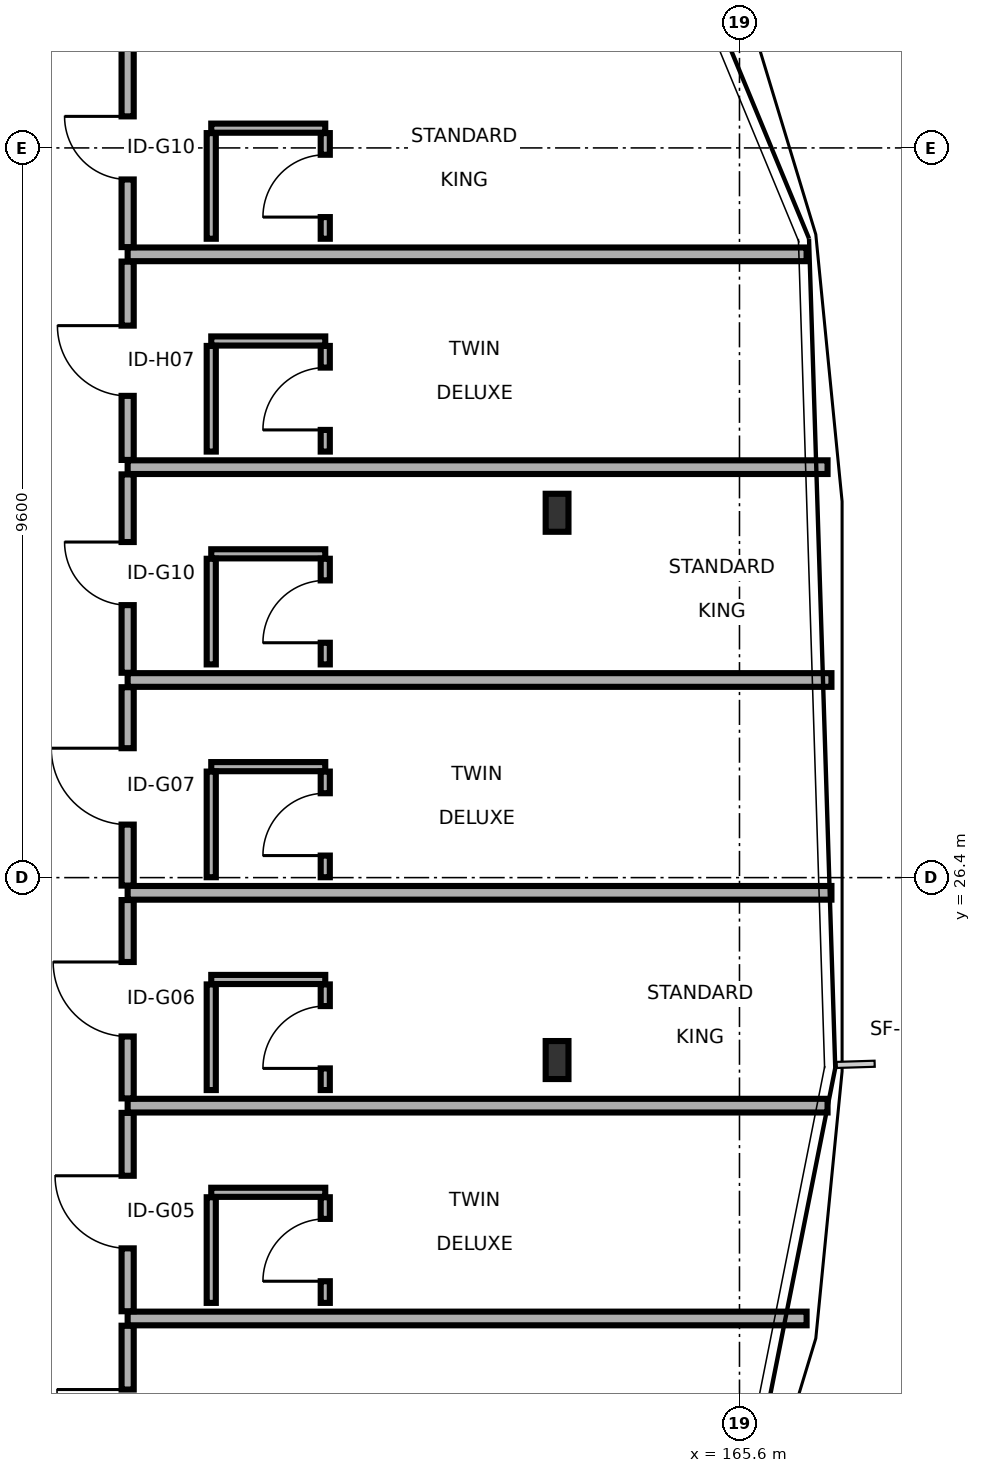
"""IFC4 building model, lengths in metres.
Left out: names, types, materials, properties, quantities, classifications, styles, units other than length and angle.
Written with IfcOpenShell. Run it as: python <this file> out.ifc"""

import sys

from ifc_helpers import new_model, si_unit, direction, frame, frame_2d, origin, origin_2d, place, context, subcontext, project, spatial, rectangle, i_section, extrude, element, fill, save


model = new_model("IFC4")
c1 = context("Model", 3, precision=1e-05, world=origin(), true_north=direction((0.0, 1.0)))
c2 = subcontext(c1, "Body", "Model", "MODEL_VIEW")
j1 = project(units=[si_unit("LENGTHUNIT", "METRE"), si_unit("PLANEANGLEUNIT", "RADIAN")], contexts=[c1])
p1 = place(None, origin())
s1 = spatial("IfcSite", under=j1, at=p1, CompositionType="ELEMENT")
p2 = place(p1, origin())
s2 = spatial("IfcBuilding", under=s1, at=p2, CompositionType="ELEMENT")
p3 = place(p2, frame((0.0, 0.0, 24.9)))
s3 = spatial("IfcBuildingStorey", under=s2, at=p3, CompositionType="ELEMENT", Elevation=24.9)
for number, where, z_axis, x_axis in (
    (1, (163.2, 24.0, 0.0), (0.0, 0.0, 1.0), (1.0, 0.0, 0.0)),
    (2, (163.2, 31.2, 0.0), (0.0, 0.0, 1.0), (1.0, 0.0, 0.0)),
):
    element("IfcColumn", number, at=place(p3, frame(where, z_axis=z_axis, x_axis=x_axis)), inside=s3, PredefinedType="COLUMN", context=c2, shape_type="SweptSolid", body=[
        extrude(i_section(OverallWidth=0.3, OverallDepth=0.5, WebThickness=0.014, FlangeThickness=0.028, FilletRadius=0.027, at=origin_2d()), origin(), (0.0, 0.0, 1.0), 3.4),
    ])
p4 = place(p3, frame((157.55, 17.895, 0.0), z_axis=(0.0, 0.0, 1.0), x_axis=(0.0, 1.0, 0.0)))
e3 = element("IfcWall", 3, at=p4, inside=s3, PredefinedType="PARTITIONING", context=c2, shape_type="SweptSolid", body=[
    extrude(rectangle(XDim=2.61, YDim=0.16, at=frame_2d((1.305, 0.0))), origin(), (0.0, 0.0, 1.0), 3.19),
])
p5 = place(p4, frame((0.84, 0.0, 0.0)))
e4 = element("IfcOpeningElement", 4, at=p5, cuts=e3, PredefinedType="OPENING", context=c2, shape_type="SweptSolid", body=[
    extrude(rectangle(XDim=0.93, YDim=2.05, at=frame_2d((0.465, 1.025))), frame((0.0, 0.09, 0.0), z_axis=(0.0, -1.0, 0.0), x_axis=(1.0, 0.0, 0.0)), (0.0, 0.0, 1.0), 0.18),
])
p6 = place(p3, frame((157.55, 20.6, 0.0), z_axis=(0.0, 0.0, 1.0), x_axis=(1.0, 0.0, 0.0)))
e5 = element("IfcWall", 5, at=p6, inside=s3, PredefinedType="PARTITIONING", context=c2, shape_type="SweptSolid", body=[
    extrude(rectangle(XDim=8.933, YDim=0.18, at=frame_2d((4.466, 0.0))), origin(), (0.0, 0.0, 1.0), 2.675),
])
p7 = place(p3, frame((157.55, 20.695, 0.0), z_axis=(0.0, 0.0, 1.0), x_axis=(0.0, 1.0, 0.0)))
e6 = element("IfcWall", 6, at=p7, inside=s3, PredefinedType="PARTITIONING", context=c2, shape_type="SweptSolid", body=[
    extrude(rectangle(XDim=2.61, YDim=0.16, at=frame_2d((1.305, 0.0))), origin(), (0.0, 0.0, 1.0), 3.19),
])
p8 = place(p7, frame((0.827, 0.0, 0.0)))
e7 = element("IfcOpeningElement", 7, at=p8, cuts=e6, PredefinedType="OPENING", context=c2, shape_type="SweptSolid", body=[
    extrude(rectangle(XDim=0.955, YDim=2.05, at=frame_2d((0.478, 1.025))), frame((0.0, 0.09, 0.0), z_axis=(0.0, -1.0, 0.0), x_axis=(1.0, 0.0, 0.0)), (0.0, 0.0, 1.0), 0.18),
])
p9 = place(p3, frame((158.65, 22.26, 0.0), z_axis=(0.0, 0.0, 1.0), x_axis=(1.0, 0.0, 0.0)))
e8 = element("IfcWall", 8, at=p9, inside=s3, PredefinedType="PARTITIONING", context=c2, shape_type="SweptSolid", body=[
    extrude(rectangle(XDim=1.5, YDim=0.12, at=frame_2d((0.75, 0.0))), origin(), (0.0, 0.0, 1.0), 3.19),
])
p10 = place(p3, frame((158.65, 20.805, 0.0), z_axis=(0.0, 0.0, 1.0), x_axis=(0.0, 1.0, 0.0)))
e9 = element("IfcWall", 9, at=p10, inside=s3, PredefinedType="PARTITIONING", context=c2, shape_type="SweptSolid", body=[
    extrude(rectangle(XDim=1.39, YDim=0.12, at=frame_2d((0.695, 0.0))), origin(), (0.0, 0.0, 1.0), 3.19),
])
p11 = place(p3, frame((160.15, 20.805, 0.0), z_axis=(0.0, 0.0, 1.0), x_axis=(0.0, 1.0, 0.0)))
e10 = element("IfcWall", 10, at=p11, inside=s3, PredefinedType="PARTITIONING", context=c2, shape_type="SweptSolid", body=[
    extrude(rectangle(XDim=1.39, YDim=0.12, at=frame_2d((0.695, 0.0))), origin(), (0.0, 0.0, 1.0), 3.19),
])
p12 = place(p11, frame((0.285, 0.0, 0.0)))
e11 = element("IfcOpeningElement", 11, at=p12, cuts=e10, PredefinedType="OPENING", context=c2, shape_type="SweptSolid", body=[
    extrude(rectangle(XDim=0.82, YDim=2.08, at=frame_2d((0.41, 1.04))), frame((0.0, 0.07, 0.0), z_axis=(0.0, -1.0, 0.0), x_axis=(1.0, 0.0, 0.0)), (0.0, 0.0, 1.0), 0.14),
])
p13 = place(p3, frame((157.55, 23.4, 0.0), z_axis=(0.0, 0.0, 1.0), x_axis=(1.0, 0.0, 0.0)))
e12 = element("IfcWall", 12, at=p13, inside=s3, PredefinedType="PARTITIONING", context=c2, shape_type="SweptSolid", body=[
    extrude(rectangle(XDim=9.209, YDim=0.18, at=frame_2d((4.604, 0.0))), origin(), (0.0, 0.0, 1.0), 2.675),
])
p14 = place(p3, frame((157.55, 23.495, 0.0), z_axis=(0.0, 0.0, 1.0), x_axis=(0.0, 1.0, 0.0)))
e13 = element("IfcWall", 13, at=p14, inside=s3, PredefinedType="PARTITIONING", context=c2, shape_type="SweptSolid", body=[
    extrude(rectangle(XDim=2.61, YDim=0.16, at=frame_2d((1.305, 0.0))), origin(), (0.0, 0.0, 1.0), 2.725),
])
p15 = place(p14, frame((0.815, 0.0, 0.0)))
e14 = element("IfcOpeningElement", 14, at=p15, cuts=e13, PredefinedType="OPENING", context=c2, shape_type="SweptSolid", body=[
    extrude(rectangle(XDim=0.98, YDim=2.05, at=frame_2d((0.49, 1.025))), frame((0.0, 0.09, 0.0), z_axis=(0.0, -1.0, 0.0), x_axis=(1.0, 0.0, 0.0)), (0.0, 0.0, 1.0), 0.18),
])
p16 = place(p3, frame((158.65, 25.06, 0.0), z_axis=(0.0, 0.0, 1.0), x_axis=(1.0, 0.0, 0.0)))
e15 = element("IfcWall", 15, at=p16, inside=s3, PredefinedType="PARTITIONING", context=c2, shape_type="SweptSolid", body=[
    extrude(rectangle(XDim=1.5, YDim=0.12, at=frame_2d((0.75, 0.0))), origin(), (0.0, 0.0, 1.0), 3.19),
])
p17 = place(p3, frame((158.65, 23.605, 0.0), z_axis=(0.0, 0.0, 1.0), x_axis=(0.0, 1.0, 0.0)))
e16 = element("IfcWall", 16, at=p17, inside=s3, PredefinedType="PARTITIONING", context=c2, shape_type="SweptSolid", body=[
    extrude(rectangle(XDim=1.39, YDim=0.12, at=frame_2d((0.695, 0.0))), origin(), (0.0, 0.0, 1.0), 2.725),
])
p18 = place(p3, frame((160.15, 23.605, 0.0), z_axis=(0.0, 0.0, 1.0), x_axis=(0.0, 1.0, 0.0)))
e17 = element("IfcWall", 17, at=p18, inside=s3, PredefinedType="PARTITIONING", context=c2, shape_type="SweptSolid", body=[
    extrude(rectangle(XDim=1.39, YDim=0.12, at=frame_2d((0.695, 0.0))), origin(), (0.0, 0.0, 1.0), 2.725),
])
p19 = place(p18, frame((0.285, 0.0, 0.0)))
e18 = element("IfcOpeningElement", 18, at=p19, cuts=e17, PredefinedType="OPENING", context=c2, shape_type="SweptSolid", body=[
    extrude(rectangle(XDim=0.82, YDim=2.08, at=frame_2d((0.41, 1.04))), frame((0.0, 0.07, 0.0), z_axis=(0.0, -1.0, 0.0), x_axis=(1.0, 0.0, 0.0)), (0.0, 0.0, 1.0), 0.14),
])
p20 = place(p3, frame((157.55, 26.2, 0.0), z_axis=(0.0, 0.0, 1.0), x_axis=(1.0, 0.0, 0.0)))
e19 = element("IfcWall", 19, at=p20, inside=s3, PredefinedType="PARTITIONING", context=c2, shape_type="SweptSolid", body=[
    extrude(rectangle(XDim=9.26, YDim=0.18, at=frame_2d((4.63, 0.0))), origin(), (0.0, 0.0, 1.0), 2.675),
])
p21 = place(p3, frame((157.55, 26.295, 0.0), z_axis=(0.0, 0.0, 1.0), x_axis=(0.0, 1.0, 0.0)))
e20 = element("IfcWall", 20, at=p21, inside=s3, PredefinedType="PARTITIONING", context=c2, shape_type="SweptSolid", body=[
    extrude(rectangle(XDim=2.61, YDim=0.16, at=frame_2d((1.305, 0.0))), origin(), (0.0, 0.0, 1.0), 3.19),
])
p22 = place(p21, frame((0.802, 0.0, 0.0)))
e21 = element("IfcOpeningElement", 21, at=p22, cuts=e20, PredefinedType="OPENING", context=c2, shape_type="SweptSolid", body=[
    extrude(rectangle(XDim=1.005, YDim=2.05, at=frame_2d((0.502, 1.025))), frame((0.0, 0.09, 0.0), z_axis=(0.0, -1.0, 0.0), x_axis=(1.0, 0.0, 0.0)), (0.0, 0.0, 1.0), 0.18),
])
p23 = place(p3, frame((158.65, 27.86, 0.0), z_axis=(0.0, 0.0, 1.0), x_axis=(1.0, 0.0, 0.0)))
e22 = element("IfcWall", 22, at=p23, inside=s3, PredefinedType="PARTITIONING", context=c2, shape_type="SweptSolid", body=[
    extrude(rectangle(XDim=1.5, YDim=0.12, at=frame_2d((0.75, 0.0))), origin(), (0.0, 0.0, 1.0), 3.19),
])
p24 = place(p3, frame((158.65, 26.405, 0.0), z_axis=(0.0, 0.0, 1.0), x_axis=(0.0, 1.0, 0.0)))
e23 = element("IfcWall", 23, at=p24, inside=s3, PredefinedType="PARTITIONING", context=c2, shape_type="SweptSolid", body=[
    extrude(rectangle(XDim=1.39, YDim=0.12, at=frame_2d((0.695, 0.0))), origin(), (0.0, 0.0, 1.0), 3.19),
])
p25 = place(p3, frame((160.15, 26.405, 0.0), z_axis=(0.0, 0.0, 1.0), x_axis=(0.0, 1.0, 0.0)))
e24 = element("IfcWall", 24, at=p25, inside=s3, PredefinedType="PARTITIONING", context=c2, shape_type="SweptSolid", body=[
    extrude(rectangle(XDim=1.39, YDim=0.12, at=frame_2d((0.695, 0.0))), origin(), (0.0, 0.0, 1.0), 3.19),
])
p26 = place(p25, frame((0.285, 0.0, 0.0)))
e25 = element("IfcOpeningElement", 25, at=p26, cuts=e24, PredefinedType="OPENING", context=c2, shape_type="SweptSolid", body=[
    extrude(rectangle(XDim=0.82, YDim=2.08, at=frame_2d((0.41, 1.04))), frame((0.0, 0.07, 0.0), z_axis=(0.0, -1.0, 0.0), x_axis=(1.0, 0.0, 0.0)), (0.0, 0.0, 1.0), 0.14),
])
p27 = place(p3, frame((157.55, 29.0, 0.0), z_axis=(0.0, 0.0, 1.0), x_axis=(1.0, 0.0, 0.0)))
e26 = element("IfcWall", 26, at=p27, inside=s3, PredefinedType="PARTITIONING", context=c2, shape_type="SweptSolid", body=[
    extrude(rectangle(XDim=9.26, YDim=0.18, at=frame_2d((4.63, 0.0))), origin(), (0.0, 0.0, 1.0), 2.675),
])
p28 = place(p3, frame((157.55, 29.095, 0.0), z_axis=(0.0, 0.0, 1.0), x_axis=(0.0, 1.0, 0.0)))
e27 = element("IfcWall", 27, at=p28, inside=s3, PredefinedType="PARTITIONING", context=c2, shape_type="SweptSolid", body=[
    extrude(rectangle(XDim=2.61, YDim=0.16, at=frame_2d((1.305, 0.0))), origin(), (0.0, 0.0, 1.0), 2.725),
])
p29 = place(p28, frame((0.89, 0.0, 0.0)))
e28 = element("IfcOpeningElement", 28, at=p29, cuts=e27, PredefinedType="OPENING", context=c2, shape_type="SweptSolid", body=[
    extrude(rectangle(XDim=0.83, YDim=2.11, at=frame_2d((0.415, 1.055))), frame((0.0, 0.09, 0.0), z_axis=(0.0, -1.0, 0.0), x_axis=(1.0, 0.0, 0.0)), (0.0, 0.0, 1.0), 0.18),
])
p30 = place(p3, frame((158.65, 30.66, 0.0), z_axis=(0.0, 0.0, 1.0), x_axis=(1.0, 0.0, 0.0)))
e29 = element("IfcWall", 29, at=p30, inside=s3, PredefinedType="PARTITIONING", context=c2, shape_type="SweptSolid", body=[
    extrude(rectangle(XDim=1.5, YDim=0.12, at=frame_2d((0.75, 0.0))), origin(), (0.0, 0.0, 1.0), 3.19),
])
p31 = place(p3, frame((158.65, 29.205, 0.0), z_axis=(0.0, 0.0, 1.0), x_axis=(0.0, 1.0, 0.0)))
e30 = element("IfcWall", 30, at=p31, inside=s3, PredefinedType="PARTITIONING", context=c2, shape_type="SweptSolid", body=[
    extrude(rectangle(XDim=1.39, YDim=0.12, at=frame_2d((0.695, 0.0))), origin(), (0.0, 0.0, 1.0), 3.19),
])
p32 = place(p3, frame((160.15, 29.205, 0.0), z_axis=(0.0, 0.0, 1.0), x_axis=(0.0, 1.0, 0.0)))
e31 = element("IfcWall", 31, at=p32, inside=s3, PredefinedType="PARTITIONING", context=c2, shape_type="SweptSolid", body=[
    extrude(rectangle(XDim=1.39, YDim=0.12, at=frame_2d((0.695, 0.0))), origin(), (0.0, 0.0, 1.0), 3.19),
])
p33 = place(p32, frame((0.285, 0.0, 0.0)))
e32 = element("IfcOpeningElement", 32, at=p33, cuts=e31, PredefinedType="OPENING", context=c2, shape_type="SweptSolid", body=[
    extrude(rectangle(XDim=0.82, YDim=2.08, at=frame_2d((0.41, 1.04))), frame((0.0, 0.07, 0.0), z_axis=(0.0, -1.0, 0.0), x_axis=(1.0, 0.0, 0.0)), (0.0, 0.0, 1.0), 0.14),
])
p34 = place(p3, frame((157.55, 31.8, 0.0), z_axis=(0.0, 0.0, 1.0), x_axis=(1.0, 0.0, 0.0)))
e33 = element("IfcWall", 33, at=p34, inside=s3, PredefinedType="PARTITIONING", context=c2, shape_type="SweptSolid", body=[
    extrude(rectangle(XDim=9.209, YDim=0.18, at=frame_2d((4.604, 0.0))), origin(), (0.0, 0.0, 1.0), 2.675),
])
p35 = place(p3, frame((157.55, 31.895, 0.0), z_axis=(0.0, 0.0, 1.0), x_axis=(0.0, 1.0, 0.0)))
e34 = element("IfcWall", 34, at=p35, inside=s3, PredefinedType="PARTITIONING", context=c2, shape_type="SweptSolid", body=[
    extrude(rectangle(XDim=2.61, YDim=0.16, at=frame_2d((1.305, 0.0))), origin(), (0.0, 0.0, 1.0), 3.19),
])
p36 = place(p35, frame((0.843, 0.0, 0.0)))
e35 = element("IfcOpeningElement", 35, at=p36, cuts=e34, PredefinedType="OPENING", context=c2, shape_type="SweptSolid", body=[
    extrude(rectangle(XDim=0.924, YDim=2.16, at=frame_2d((0.462, 1.08))), frame((0.0, 0.09, 0.0), z_axis=(0.0, -1.0, 0.0), x_axis=(1.0, 0.0, 0.0)), (0.0, 0.0, 1.0), 0.18),
])
p37 = place(p3, frame((158.65, 33.46, 0.0), z_axis=(0.0, 0.0, 1.0), x_axis=(1.0, 0.0, 0.0)))
e36 = element("IfcWall", 36, at=p37, inside=s3, PredefinedType="PARTITIONING", context=c2, shape_type="SweptSolid", body=[
    extrude(rectangle(XDim=1.5, YDim=0.12, at=frame_2d((0.75, 0.0))), origin(), (0.0, 0.0, 1.0), 3.19),
])
p38 = place(p3, frame((158.65, 32.005, 0.0), z_axis=(0.0, 0.0, 1.0), x_axis=(0.0, 1.0, 0.0)))
e37 = element("IfcWall", 37, at=p38, inside=s3, PredefinedType="PARTITIONING", context=c2, shape_type="SweptSolid", body=[
    extrude(rectangle(XDim=1.39, YDim=0.12, at=frame_2d((0.695, 0.0))), origin(), (0.0, 0.0, 1.0), 3.19),
])
p39 = place(p3, frame((160.15, 32.005, 0.0), z_axis=(0.0, 0.0, 1.0), x_axis=(0.0, 1.0, 0.0)))
e38 = element("IfcWall", 38, at=p39, inside=s3, PredefinedType="PARTITIONING", context=c2, shape_type="SweptSolid", body=[
    extrude(rectangle(XDim=1.39, YDim=0.12, at=frame_2d((0.695, 0.0))), origin(), (0.0, 0.0, 1.0), 3.19),
])
p40 = place(p39, frame((0.285, 0.0, 0.0)))
e39 = element("IfcOpeningElement", 39, at=p40, cuts=e38, PredefinedType="OPENING", context=c2, shape_type="SweptSolid", body=[
    extrude(rectangle(XDim=0.82, YDim=2.08, at=frame_2d((0.41, 1.04))), frame((0.0, 0.07, 0.0), z_axis=(0.0, -1.0, 0.0), x_axis=(1.0, 0.0, 0.0)), (0.0, 0.0, 1.0), 0.14),
])
p41 = place(p3, frame((157.55, 34.6, 0.0), z_axis=(0.0, 0.0, 1.0), x_axis=(1.0, 0.0, 0.0)))
e40 = element("IfcWall", 40, at=p41, inside=s3, PredefinedType="PARTITIONING", context=c2, shape_type="SweptSolid", body=[
    extrude(rectangle(XDim=8.933, YDim=0.18, at=frame_2d((4.466, 0.0))), origin(), (0.0, 0.0, 1.0), 2.675),
])
p42 = place(p3, frame((157.55, 34.695, 0.0), z_axis=(0.0, 0.0, 1.0), x_axis=(0.0, 1.0, 0.0)))
e41 = element("IfcWall", 41, at=p42, inside=s3, PredefinedType="PARTITIONING", context=c2, shape_type="SweptSolid", body=[
    extrude(rectangle(XDim=2.61, YDim=0.16, at=frame_2d((1.305, 0.0))), origin(), (0.0, 0.0, 1.0), 3.19),
])
p43 = place(p42, frame((0.89, 0.0, 0.0)))
e42 = element("IfcOpeningElement", 42, at=p43, cuts=e41, PredefinedType="OPENING", context=c2, shape_type="SweptSolid", body=[
    extrude(rectangle(XDim=0.83, YDim=2.11, at=frame_2d((0.415, 1.055))), frame((0.0, 0.09, 0.0), z_axis=(0.0, -1.0, 0.0), x_axis=(1.0, 0.0, 0.0)), (0.0, 0.0, 1.0), 0.18),
])
p44 = place(p3, frame((158.65, 36.26, 0.0), z_axis=(0.0, 0.0, 1.0), x_axis=(1.0, 0.0, 0.0)))
e43 = element("IfcWall", 43, at=p44, inside=s3, PredefinedType="PARTITIONING", context=c2, shape_type="SweptSolid", body=[
    extrude(rectangle(XDim=1.5, YDim=0.12, at=frame_2d((0.75, 0.0))), origin(), (0.0, 0.0, 1.0), 3.19),
])
p45 = place(p3, frame((158.65, 34.805, 0.0), z_axis=(0.0, 0.0, 1.0), x_axis=(0.0, 1.0, 0.0)))
e44 = element("IfcWall", 44, at=p45, inside=s3, PredefinedType="PARTITIONING", context=c2, shape_type="SweptSolid", body=[
    extrude(rectangle(XDim=1.39, YDim=0.12, at=frame_2d((0.695, 0.0))), origin(), (0.0, 0.0, 1.0), 3.19),
])
p46 = place(p3, frame((160.15, 34.805, 0.0), z_axis=(0.0, 0.0, 1.0), x_axis=(0.0, 1.0, 0.0)))
e45 = element("IfcWall", 45, at=p46, inside=s3, PredefinedType="PARTITIONING", context=c2, shape_type="SweptSolid", body=[
    extrude(rectangle(XDim=1.39, YDim=0.12, at=frame_2d((0.695, 0.0))), origin(), (0.0, 0.0, 1.0), 3.19),
])
p47 = place(p46, frame((0.285, 0.0, 0.0)))
e46 = element("IfcOpeningElement", 46, at=p47, cuts=e45, PredefinedType="OPENING", context=c2, shape_type="SweptSolid", body=[
    extrude(rectangle(XDim=0.82, YDim=2.08, at=frame_2d((0.41, 1.04))), frame((0.0, 0.07, 0.0), z_axis=(0.0, -1.0, 0.0), x_axis=(1.0, 0.0, 0.0)), (0.0, 0.0, 1.0), 0.14),
])
p48 = place(p5, origin())
e47 = element("IfcDoor", 47, at=p48, inside=s3, OperationType="SINGLE_SWING_RIGHT", PredefinedType="DOOR", context=c2, shape_type="SweptSolid", body=[
    extrude(rectangle(XDim=0.93, YDim=2.05, at=frame_2d((0.465, 1.025))), frame((0.0, 0.025, 0.0), z_axis=(0.0, -1.0, 0.0), x_axis=(1.0, 0.0, 0.0)), (0.0, 0.0, 1.0), 0.05),
])
fill(e4, e47)
p49 = place(p8, origin())
e48 = element("IfcDoor", 48, at=p49, inside=s3, OperationType="SINGLE_SWING_RIGHT", PredefinedType="DOOR", context=c2, shape_type="SweptSolid", body=[
    extrude(rectangle(XDim=0.955, YDim=2.05, at=frame_2d((0.478, 1.025))), frame((0.0, 0.025, 0.0), z_axis=(0.0, -1.0, 0.0), x_axis=(1.0, 0.0, 0.0)), (0.0, 0.0, 1.0), 0.05),
])
fill(e7, e48)
p50 = place(p12, origin())
e49 = element("IfcDoor", 49, at=p50, inside=s3, OperationType="SINGLE_SWING_LEFT", PredefinedType="DOOR", context=c2, shape_type="SweptSolid", body=[
    extrude(rectangle(XDim=0.82, YDim=2.08, at=frame_2d((0.41, 1.04))), frame((0.0, 0.025, 0.0), z_axis=(0.0, -1.0, 0.0), x_axis=(1.0, 0.0, 0.0)), (0.0, 0.0, 1.0), 0.05),
])
fill(e11, e49)
p51 = place(p15, origin())
e50 = element("IfcDoor", 50, at=p51, inside=s3, OperationType="SINGLE_SWING_RIGHT", PredefinedType="DOOR", context=c2, shape_type="SweptSolid", body=[
    extrude(rectangle(XDim=0.98, YDim=2.05, at=frame_2d((0.49, 1.025))), frame((0.0, 0.025, 0.0), z_axis=(0.0, -1.0, 0.0), x_axis=(1.0, 0.0, 0.0)), (0.0, 0.0, 1.0), 0.05),
])
fill(e14, e50)
p52 = place(p19, origin())
e51 = element("IfcDoor", 51, at=p52, inside=s3, OperationType="SINGLE_SWING_LEFT", PredefinedType="DOOR", context=c2, shape_type="SweptSolid", body=[
    extrude(rectangle(XDim=0.82, YDim=2.08, at=frame_2d((0.41, 1.04))), frame((0.0, 0.025, 0.0), z_axis=(0.0, -1.0, 0.0), x_axis=(1.0, 0.0, 0.0)), (0.0, 0.0, 1.0), 0.05),
])
fill(e18, e51)
p53 = place(p22, origin())
e52 = element("IfcDoor", 52, at=p53, inside=s3, OperationType="SINGLE_SWING_RIGHT", PredefinedType="DOOR", context=c2, shape_type="SweptSolid", body=[
    extrude(rectangle(XDim=1.005, YDim=2.05, at=frame_2d((0.502, 1.025))), frame((0.0, 0.025, 0.0), z_axis=(0.0, -1.0, 0.0), x_axis=(1.0, 0.0, 0.0)), (0.0, 0.0, 1.0), 0.05),
])
fill(e21, e52)
p54 = place(p26, origin())
e53 = element("IfcDoor", 53, at=p54, inside=s3, OperationType="SINGLE_SWING_LEFT", PredefinedType="DOOR", context=c2, shape_type="SweptSolid", body=[
    extrude(rectangle(XDim=0.82, YDim=2.08, at=frame_2d((0.41, 1.04))), frame((0.0, 0.025, 0.0), z_axis=(0.0, -1.0, 0.0), x_axis=(1.0, 0.0, 0.0)), (0.0, 0.0, 1.0), 0.05),
])
fill(e25, e53)
p55 = place(p29, origin())
e54 = element("IfcDoor", 54, at=p55, inside=s3, OperationType="SINGLE_SWING_RIGHT", PredefinedType="DOOR", context=c2, shape_type="SweptSolid", body=[
    extrude(rectangle(XDim=0.83, YDim=2.11, at=frame_2d((0.415, 1.055))), frame((0.0, 0.025, 0.0), z_axis=(0.0, -1.0, 0.0), x_axis=(1.0, 0.0, 0.0)), (0.0, 0.0, 1.0), 0.05),
])
fill(e28, e54)
p56 = place(p33, origin())
e55 = element("IfcDoor", 55, at=p56, inside=s3, OperationType="SINGLE_SWING_LEFT", PredefinedType="DOOR", context=c2, shape_type="SweptSolid", body=[
    extrude(rectangle(XDim=0.82, YDim=2.08, at=frame_2d((0.41, 1.04))), frame((0.0, 0.025, 0.0), z_axis=(0.0, -1.0, 0.0), x_axis=(1.0, 0.0, 0.0)), (0.0, 0.0, 1.0), 0.05),
])
fill(e32, e55)
p57 = place(p36, origin())
e56 = element("IfcDoor", 56, at=p57, inside=s3, OperationType="SINGLE_SWING_RIGHT", PredefinedType="DOOR", context=c2, shape_type="SweptSolid", body=[
    extrude(rectangle(XDim=0.924, YDim=2.16, at=frame_2d((0.462, 1.08))), frame((0.0, 0.025, 0.0), z_axis=(0.0, -1.0, 0.0), x_axis=(1.0, 0.0, 0.0)), (0.0, 0.0, 1.0), 0.05),
])
fill(e35, e56)
p58 = place(p40, origin())
e57 = element("IfcDoor", 57, at=p58, inside=s3, OperationType="SINGLE_SWING_LEFT", PredefinedType="DOOR", context=c2, shape_type="SweptSolid", body=[
    extrude(rectangle(XDim=0.82, YDim=2.08, at=frame_2d((0.41, 1.04))), frame((0.0, 0.025, 0.0), z_axis=(0.0, -1.0, 0.0), x_axis=(1.0, 0.0, 0.0)), (0.0, 0.0, 1.0), 0.05),
])
fill(e39, e57)
p59 = place(p43, origin())
e58 = element("IfcDoor", 58, at=p59, inside=s3, OperationType="SINGLE_SWING_RIGHT", PredefinedType="DOOR", context=c2, shape_type="SweptSolid", body=[
    extrude(rectangle(XDim=0.83, YDim=2.11, at=frame_2d((0.415, 1.055))), frame((0.0, 0.025, 0.0), z_axis=(0.0, -1.0, 0.0), x_axis=(1.0, 0.0, 0.0)), (0.0, 0.0, 1.0), 0.05),
])
fill(e42, e58)
p60 = place(p47, origin())
e59 = element("IfcDoor", 59, at=p60, inside=s3, OperationType="SINGLE_SWING_LEFT", PredefinedType="DOOR", context=c2, shape_type="SweptSolid", body=[
    extrude(rectangle(XDim=0.82, YDim=2.08, at=frame_2d((0.41, 1.04))), frame((0.0, 0.025, 0.0), z_axis=(0.0, -1.0, 0.0), x_axis=(1.0, 0.0, 0.0)), (0.0, 0.0, 1.0), 0.05),
])
fill(e46, e59)
save(model, sys.argv[1])
